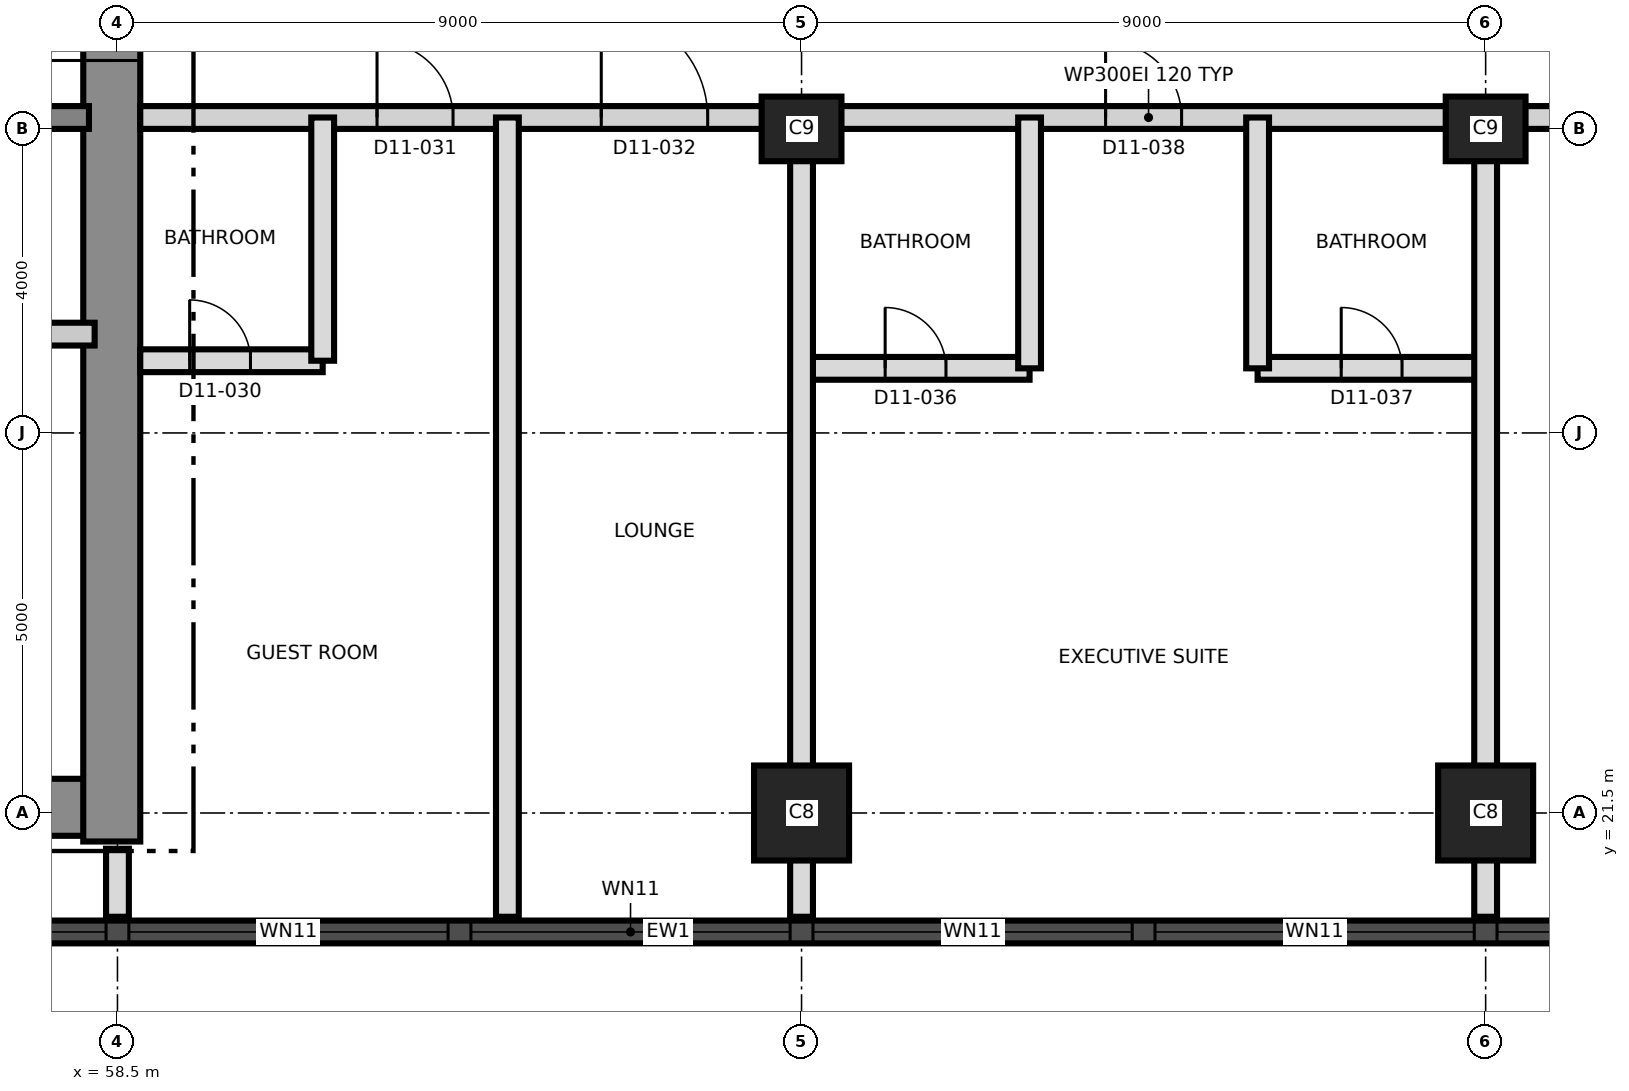
"""IFC4 building model, lengths in metres.
Left out: names, types, materials, properties, quantities, classifications, styles, units other than length and angle.
Written with IfcOpenShell. Run it as: python <this file> out.ifc"""

import sys

from ifc_helpers import new_model, si_unit, direction, frame, frame_2d, origin, origin_2d, place, context, subcontext, project, spatial, rectangle, extrude, element, fill, save


model = new_model("IFC4")
c1 = context("Model", 3, precision=1e-05, world=origin(), true_north=direction((0.0, 1.0)))
c2 = subcontext(c1, "Body", "Model", "MODEL_VIEW")
j1 = project(units=[si_unit("LENGTHUNIT", "METRE"), si_unit("PLANEANGLEUNIT", "RADIAN")], contexts=[c1])
p1 = place(None, origin())
s1 = spatial("IfcSite", under=j1, at=p1, CompositionType="ELEMENT")
p2 = place(p1, origin())
s2 = spatial("IfcBuilding", under=s1, at=p2, CompositionType="ELEMENT")
p3 = place(p2, frame((0.0, 0.0, 127.8)))
s3 = spatial("IfcBuildingStorey", under=s2, at=p3, CompositionType="ELEMENT", Elevation=127.8)
p4 = place(p3, frame((31.125, 21.575, 0.0), z_axis=(0.0, 0.0, 1.0), x_axis=(1.0, 0.0, 0.0)))
e1 = element("IfcWall", 1, at=p4, inside=s3, PredefinedType="SHEAR", context=c2, shape_type="SweptSolid", body=[
    extrude(rectangle(XDim=27.0, YDim=0.75, at=frame_2d((13.5, 0.0))), origin(), (0.0, 0.0, 1.0), 3.7),
])
p5 = place(p3, frame((58.425, 21.125, 0.0), z_axis=(0.0, 0.0, 1.0), x_axis=(0.0, 1.0, 0.0)))
e2 = element("IfcWall", 2, at=p5, inside=s3, PredefinedType="SHEAR", context=c2, shape_type="SweptSolid", body=[
    extrude(rectangle(XDim=18.75, YDim=0.75, at=frame_2d((9.375, 0.0))), origin(), (0.0, 0.0, 1.0), 3.7),
])
p6 = place(p5, frame((10.275, 0.0, 0.0)))
e3 = element("IfcOpeningElement", 3, at=p6, cuts=e2, PredefinedType="OPENING", context=c2, shape_type="SweptSolid", body=[
    extrude(rectangle(XDim=1.2, YDim=2.1, at=frame_2d((0.6, 1.05))), frame((0.0, 0.385, 0.0), z_axis=(0.0, -1.0, 0.0), x_axis=(1.0, 0.0, 0.0)), (0.0, 0.0, 1.0), 0.77),
])
p7 = place(p3, frame((31.875, 30.65, 0.0), z_axis=(0.0, 0.0, 1.0), x_axis=(1.0, 0.0, 0.0)))
e4 = element("IfcWall", 4, at=p7, inside=s3, PredefinedType="SHEAR", context=c2, shape_type="SweptSolid", body=[
    extrude(rectangle(XDim=26.25, YDim=0.3, at=frame_2d((13.125, 0.0))), origin(), (0.0, 0.0, 1.0), 3.7),
])
p8 = place(p7, frame((24.625, 0.0, 0.0)))
e5 = element("IfcOpeningElement", 5, at=p8, cuts=e4, PredefinedType="OPENING", context=c2, shape_type="SweptSolid", body=[
    extrude(rectangle(XDim=1.0, YDim=2.1, at=frame_2d((0.5, 1.05))), frame((0.0, 0.16, 0.0), z_axis=(0.0, -1.0, 0.0), x_axis=(1.0, 0.0, 0.0)), (0.0, 0.0, 1.0), 0.32),
])
p9 = place(p7, frame((11.425, 0.0, 0.0)))
e6 = element("IfcOpeningElement", 6, at=p9, cuts=e4, PredefinedType="OPENING", context=c2, shape_type="SweptSolid", body=[
    extrude(rectangle(XDim=1.0, YDim=2.1, at=frame_2d((0.5, 1.05))), frame((0.0, 0.16, 0.0), z_axis=(0.0, -1.0, 0.0), x_axis=(1.0, 0.0, 0.0)), (0.0, 0.0, 1.0), 0.32),
])
for number, where, z_axis, x_axis in (
    (7, (67.5, 21.5, 0.0), (0.0, 0.0, 1.0), (1.0, 0.0, 0.0)),
    (8, (76.5, 21.5, 0.0), (0.0, 0.0, 1.0), (1.0, 0.0, 0.0)),
):
    element("IfcColumn", number, at=place(p3, frame(where, z_axis=z_axis, x_axis=x_axis)), inside=s3, PredefinedType="COLUMN", context=c2, shape_type="SweptSolid", body=[
        extrude(rectangle(XDim=1.25, YDim=1.25, at=origin_2d()), origin(), (0.0, 0.0, 1.0), 3.7),
    ])
for number, where, z_axis, x_axis in (
    (9, (67.5, 30.5, 0.0), (0.0, 0.0, 1.0), (1.0, 0.0, 0.0)),
    (10, (76.5, 30.5, 0.0), (0.0, 0.0, 1.0), (1.0, 0.0, 0.0)),
):
    element("IfcColumn", number, at=place(p3, frame(where, z_axis=z_axis, x_axis=x_axis)), inside=s3, PredefinedType="COLUMN", context=c2, shape_type="SweptSolid", body=[
        extrude(rectangle(XDim=1.05, YDim=0.85, at=origin_2d()), origin(), (0.0, 0.0, 1.0), 3.7),
    ])
p10 = place(p3, frame((44.01, 19.935, 0.0), z_axis=(0.0, 0.0, 1.0), x_axis=(1.0, 0.0, 0.0)))
e11 = element("IfcWall", 11, at=p10, inside=s3, PredefinedType="SOLIDWALL", context=c2, shape_type="SweptSolid", body=[
    extrude(rectangle(XDim=43.477, YDim=0.3, at=frame_2d((21.738, 0.0))), origin(), (0.0, 0.0, 1.0), 3.4),
])
p11 = place(p10, frame((1.845, 0.0, 0.3)))
e12 = element("IfcOpeningElement", 12, at=p11, cuts=e11, PredefinedType="OPENING", context=c2, shape_type="SweptSolid", body=[
    extrude(rectangle(XDim=1.8, YDim=2.4, at=frame_2d((0.9, 1.2))), frame((0.0, 0.16, 0.0), z_axis=(0.0, -1.0, 0.0), x_axis=(1.0, 0.0, 0.0)), (0.0, 0.0, 1.0), 0.32),
])
p12 = place(p10, frame((5.64, 0.0, 0.9)))
e13 = element("IfcOpeningElement", 13, at=p12, cuts=e11, PredefinedType="OPENING", context=c2, shape_type="SweptSolid", body=[
    extrude(rectangle(XDim=4.2, YDim=1.5, at=frame_2d((2.1, 0.75))), frame((0.0, 0.16, 0.0), z_axis=(0.0, -1.0, 0.0), x_axis=(1.0, 0.0, 0.0)), (0.0, 0.0, 1.0), 0.32),
])
p13 = place(p10, frame((10.14, 0.0, 0.9)))
e14 = element("IfcOpeningElement", 14, at=p13, cuts=e11, PredefinedType="OPENING", context=c2, shape_type="SweptSolid", body=[
    extrude(rectangle(XDim=4.2, YDim=1.5, at=frame_2d((2.1, 0.75))), frame((0.0, 0.16, 0.0), z_axis=(0.0, -1.0, 0.0), x_axis=(1.0, 0.0, 0.0)), (0.0, 0.0, 1.0), 0.32),
])
p14 = place(p10, frame((14.64, 0.0, 0.9)))
e15 = element("IfcOpeningElement", 15, at=p14, cuts=e11, PredefinedType="OPENING", context=c2, shape_type="SweptSolid", body=[
    extrude(rectangle(XDim=4.2, YDim=1.5, at=frame_2d((2.1, 0.75))), frame((0.0, 0.16, 0.0), z_axis=(0.0, -1.0, 0.0), x_axis=(1.0, 0.0, 0.0)), (0.0, 0.0, 1.0), 0.32),
])
p15 = place(p10, frame((19.14, 0.0, 0.9)))
e16 = element("IfcOpeningElement", 16, at=p15, cuts=e11, PredefinedType="OPENING", context=c2, shape_type="SweptSolid", body=[
    extrude(rectangle(XDim=4.2, YDim=1.5, at=frame_2d((2.1, 0.75))), frame((0.0, 0.16, 0.0), z_axis=(0.0, -1.0, 0.0), x_axis=(1.0, 0.0, 0.0)), (0.0, 0.0, 1.0), 0.32),
])
p16 = place(p10, frame((23.64, 0.0, 0.9)))
e17 = element("IfcOpeningElement", 17, at=p16, cuts=e11, PredefinedType="OPENING", context=c2, shape_type="SweptSolid", body=[
    extrude(rectangle(XDim=4.2, YDim=1.5, at=frame_2d((2.1, 0.75))), frame((0.0, 0.16, 0.0), z_axis=(0.0, -1.0, 0.0), x_axis=(1.0, 0.0, 0.0)), (0.0, 0.0, 1.0), 0.32),
])
p17 = place(p10, frame((28.14, 0.0, 0.9)))
e18 = element("IfcOpeningElement", 18, at=p17, cuts=e11, PredefinedType="OPENING", context=c2, shape_type="SweptSolid", body=[
    extrude(rectangle(XDim=4.2, YDim=1.5, at=frame_2d((2.1, 0.75))), frame((0.0, 0.16, 0.0), z_axis=(0.0, -1.0, 0.0), x_axis=(1.0, 0.0, 0.0)), (0.0, 0.0, 1.0), 0.32),
])
p18 = place(p10, frame((32.64, 0.0, 0.9)))
e19 = element("IfcOpeningElement", 19, at=p18, cuts=e11, PredefinedType="OPENING", context=c2, shape_type="SweptSolid", body=[
    extrude(rectangle(XDim=4.2, YDim=1.5, at=frame_2d((2.1, 0.75))), frame((0.0, 0.16, 0.0), z_axis=(0.0, -1.0, 0.0), x_axis=(1.0, 0.0, 0.0)), (0.0, 0.0, 1.0), 0.32),
])
p19 = place(p10, frame((37.14, 0.0, 0.9)))
e20 = element("IfcOpeningElement", 20, at=p19, cuts=e11, PredefinedType="OPENING", context=c2, shape_type="SweptSolid", body=[
    extrude(rectangle(XDim=4.2, YDim=1.5, at=frame_2d((2.1, 0.75))), frame((0.0, 0.16, 0.0), z_axis=(0.0, -1.0, 0.0), x_axis=(1.0, 0.0, 0.0)), (0.0, 0.0, 1.0), 0.32),
])
p20 = place(p3, frame((55.8, 27.8, 0.0), z_axis=(0.0, 0.0, 1.0), x_axis=(1.0, 0.0, 0.0)))
e21 = element("IfcWall", 21, at=p20, inside=s3, PredefinedType="PARTITIONING", context=c2, shape_type="SweptSolid", body=[
    extrude(rectangle(XDim=2.4, YDim=0.3, at=frame_2d((1.2, 0.0))), origin(), (0.0, 0.0, 1.0), 3.4),
])
p21 = place(p20, frame((0.75, 0.0, 0.0)))
e22 = element("IfcOpeningElement", 22, at=p21, cuts=e21, PredefinedType="OPENING", context=c2, shape_type="SweptSolid", body=[
    extrude(rectangle(XDim=0.9, YDim=2.1, at=frame_2d((0.45, 1.05))), frame((0.0, 0.16, 0.0), z_axis=(0.0, -1.0, 0.0), x_axis=(1.0, 0.0, 0.0)), (0.0, 0.0, 1.0), 0.32),
])
p22 = place(p3, frame((67.5, 27.35, 0.0), z_axis=(0.0, 0.0, 1.0), x_axis=(1.0, 0.0, 0.0)))
e23 = element("IfcWall", 23, at=p22, inside=s3, PredefinedType="PARTITIONING", context=c2, shape_type="SweptSolid", body=[
    extrude(rectangle(XDim=3.0, YDim=0.3, at=frame_2d((1.5, 0.0))), origin(), (0.0, 0.0, 1.0), 3.4),
])
p23 = place(p22, frame((1.1, 0.0, 0.0)))
e24 = element("IfcOpeningElement", 24, at=p23, cuts=e23, PredefinedType="OPENING", context=c2, shape_type="SweptSolid", body=[
    extrude(rectangle(XDim=0.8, YDim=2.1, at=frame_2d((0.4, 1.05))), frame((0.0, 0.16, 0.0), z_axis=(0.0, -1.0, 0.0), x_axis=(1.0, 0.0, 0.0)), (0.0, 0.0, 1.0), 0.32),
])
p24 = place(p3, frame((73.5, 27.35, 0.0), z_axis=(0.0, 0.0, 1.0), x_axis=(1.0, 0.0, 0.0)))
e25 = element("IfcWall", 25, at=p24, inside=s3, PredefinedType="PARTITIONING", context=c2, shape_type="SweptSolid", body=[
    extrude(rectangle(XDim=3.0, YDim=0.3, at=frame_2d((1.5, 0.0))), origin(), (0.0, 0.0, 1.0), 3.4),
])
p25 = place(p24, frame((1.1, 0.0, 0.0)))
e26 = element("IfcOpeningElement", 26, at=p25, cuts=e25, PredefinedType="OPENING", context=c2, shape_type="SweptSolid", body=[
    extrude(rectangle(XDim=0.8, YDim=2.1, at=frame_2d((0.4, 1.05))), frame((0.0, 0.16, 0.0), z_axis=(0.0, -1.0, 0.0), x_axis=(1.0, 0.0, 0.0)), (0.0, 0.0, 1.0), 0.32),
])
p26 = place(p3, frame((58.8, 27.45, 0.0), z_axis=(0.0, 0.0, 1.0), x_axis=(1.0, 0.0, 0.0)))
e27 = element("IfcWall", 27, at=p26, inside=s3, PredefinedType="PARTITIONING", context=c2, shape_type="SweptSolid", body=[
    extrude(rectangle(XDim=2.4, YDim=0.3, at=frame_2d((1.2, 0.0))), origin(), (0.0, 0.0, 1.0), 3.4),
])
p27 = place(p26, frame((0.65, 0.0, 0.0)))
e28 = element("IfcOpeningElement", 28, at=p27, cuts=e27, PredefinedType="OPENING", context=c2, shape_type="SweptSolid", body=[
    extrude(rectangle(XDim=0.8, YDim=2.1, at=frame_2d((0.4, 1.05))), frame((0.0, 0.16, 0.0), z_axis=(0.0, -1.0, 0.0), x_axis=(1.0, 0.0, 0.0)), (0.0, 0.0, 1.0), 0.32),
])
p28 = place(p3, frame((58.8, 30.65, 0.0), z_axis=(0.0, 0.0, 1.0), x_axis=(1.0, 0.0, 0.0)))
e29 = element("IfcWall", 29, at=p28, inside=s3, PredefinedType="PARTITIONING", context=c2, shape_type="SweptSolid", body=[
    extrude(rectangle(XDim=26.53, YDim=0.3, at=frame_2d((13.265, 0.0))), origin(), (0.0, 0.0, 1.0), 3.4),
])
p29 = place(p28, frame((3.115, 0.0, 0.0)))
e30 = element("IfcOpeningElement", 30, at=p29, cuts=e29, PredefinedType="OPENING", context=c2, shape_type="SweptSolid", body=[
    extrude(rectangle(XDim=1.0, YDim=2.1, at=frame_2d((0.5, 1.05))), frame((0.0, 0.16, 0.0), z_axis=(0.0, -1.0, 0.0), x_axis=(1.0, 0.0, 0.0)), (0.0, 0.0, 1.0), 0.32),
])
p30 = place(p28, frame((6.065, 0.0, 0.0)))
e31 = element("IfcOpeningElement", 31, at=p30, cuts=e29, PredefinedType="OPENING", context=c2, shape_type="SweptSolid", body=[
    extrude(rectangle(XDim=1.4, YDim=2.1, at=frame_2d((0.7, 1.05))), frame((0.0, 0.16, 0.0), z_axis=(0.0, -1.0, 0.0), x_axis=(1.0, 0.0, 0.0)), (0.0, 0.0, 1.0), 0.32),
])
p31 = place(p28, frame((12.7, 0.0, 0.0)))
e32 = element("IfcOpeningElement", 32, at=p31, cuts=e29, PredefinedType="OPENING", context=c2, shape_type="SweptSolid", body=[
    extrude(rectangle(XDim=1.0, YDim=2.4, at=frame_2d((0.5, 1.2))), frame((0.0, 0.16, 0.0), z_axis=(0.0, -1.0, 0.0), x_axis=(1.0, 0.0, 0.0)), (0.0, 0.0, 1.0), 0.32),
])
p32 = place(p28, frame((18.85, 0.0, 0.0)))
e33 = element("IfcOpeningElement", 33, at=p32, cuts=e29, PredefinedType="OPENING", context=c2, shape_type="SweptSolid", body=[
    extrude(rectangle(XDim=1.0, YDim=2.1, at=frame_2d((0.5, 1.05))), frame((0.0, 0.16, 0.0), z_axis=(0.0, -1.0, 0.0), x_axis=(1.0, 0.0, 0.0)), (0.0, 0.0, 1.0), 0.32),
])
p33 = place(p28, frame((24.7, 0.0, 0.0)))
e34 = element("IfcOpeningElement", 34, at=p33, cuts=e29, PredefinedType="OPENING", context=c2, shape_type="SweptSolid", body=[
    extrude(rectangle(XDim=1.0, YDim=2.1, at=frame_2d((0.5, 1.05))), frame((0.0, 0.16, 0.0), z_axis=(0.0, -1.0, 0.0), x_axis=(1.0, 0.0, 0.0)), (0.0, 0.0, 1.0), 0.32),
])
p34 = place(p3, frame((58.5, 20.135, 0.0), z_axis=(0.0, 0.0, 1.0), x_axis=(0.0, 1.0, 0.0)))
e35 = element("IfcWall", 35, at=p34, inside=s3, PredefinedType="PARTITIONING", context=c2, shape_type="SweptSolid", body=[
    extrude(rectangle(XDim=0.895, YDim=0.3, at=frame_2d((0.448, 0.0))), origin(), (0.0, 0.0, 1.0), 3.4),
])
p35 = place(p3, frame((61.2, 27.45, 0.0), z_axis=(0.0, 0.0, 1.0), x_axis=(0.0, 1.0, 0.0)))
e36 = element("IfcWall", 36, at=p35, inside=s3, PredefinedType="PARTITIONING", context=c2, shape_type="SweptSolid", body=[
    extrude(rectangle(XDim=3.2, YDim=0.3, at=frame_2d((1.6, 0.0))), origin(), (0.0, 0.0, 1.0), 3.4),
])
for number, where, z_axis, x_axis in (
    (37, (63.63, 20.135, 0.0), (0.0, 0.0, 1.0), (0.0, 1.0, 0.0)),
    (38, (67.5, 20.135, 0.0), (0.0, 0.0, 1.0), (0.0, 1.0, 0.0)),
):
    element("IfcWall", number, at=place(p3, frame(where, z_axis=z_axis, x_axis=x_axis)), inside=s3, PredefinedType="PARTITIONING", context=c2, shape_type="SweptSolid", body=[
        extrude(rectangle(XDim=10.515, YDim=0.3, at=frame_2d((5.257, 0.0))), origin(), (0.0, 0.0, 1.0), 3.4),
    ])
for number, where, z_axis, x_axis in (
    (39, (70.5, 27.35, 0.0), (0.0, 0.0, 1.0), (0.0, 1.0, 0.0)),
    (40, (73.5, 27.35, 0.0), (0.0, 0.0, 1.0), (0.0, 1.0, 0.0)),
):
    element("IfcWall", number, at=place(p3, frame(where, z_axis=z_axis, x_axis=x_axis)), inside=s3, PredefinedType="PARTITIONING", context=c2, shape_type="SweptSolid", body=[
        extrude(rectangle(XDim=3.3, YDim=0.3, at=frame_2d((1.65, 0.0))), origin(), (0.0, 0.0, 1.0), 3.4),
    ])
p36 = place(p3, frame((76.5, 20.135, 0.0), z_axis=(0.0, 0.0, 1.0), x_axis=(0.0, 1.0, 0.0)))
e41 = element("IfcWall", 41, at=p36, inside=s3, PredefinedType="PARTITIONING", context=c2, shape_type="SweptSolid", body=[
    extrude(rectangle(XDim=10.515, YDim=0.3, at=frame_2d((5.257, 0.0))), origin(), (0.0, 0.0, 1.0), 3.4),
])
p37 = place(p13, origin())
e42 = element("IfcWindow", 42, at=p37, inside=s3, PartitioningType="SINGLE_PANEL", PredefinedType="WINDOW", context=c2, shape_type="SweptSolid", body=[
    extrude(rectangle(XDim=4.2, YDim=1.5, at=frame_2d((2.1, 0.75))), frame((0.0, 0.03, 0.0), z_axis=(0.0, -1.0, 0.0), x_axis=(1.0, 0.0, 0.0)), (0.0, 0.0, 1.0), 0.06),
])
fill(e14, e42)
p38 = place(p14, origin())
e43 = element("IfcWindow", 43, at=p38, inside=s3, PartitioningType="SINGLE_PANEL", PredefinedType="WINDOW", context=c2, shape_type="SweptSolid", body=[
    extrude(rectangle(XDim=4.2, YDim=1.5, at=frame_2d((2.1, 0.75))), frame((0.0, 0.03, 0.0), z_axis=(0.0, -1.0, 0.0), x_axis=(1.0, 0.0, 0.0)), (0.0, 0.0, 1.0), 0.06),
])
fill(e15, e43)
p39 = place(p15, origin())
e44 = element("IfcWindow", 44, at=p39, inside=s3, PartitioningType="SINGLE_PANEL", PredefinedType="WINDOW", context=c2, shape_type="SweptSolid", body=[
    extrude(rectangle(XDim=4.2, YDim=1.5, at=frame_2d((2.1, 0.75))), frame((0.0, 0.03, 0.0), z_axis=(0.0, -1.0, 0.0), x_axis=(1.0, 0.0, 0.0)), (0.0, 0.0, 1.0), 0.06),
])
fill(e16, e44)
p40 = place(p16, origin())
e45 = element("IfcWindow", 45, at=p40, inside=s3, PartitioningType="SINGLE_PANEL", PredefinedType="WINDOW", context=c2, shape_type="SweptSolid", body=[
    extrude(rectangle(XDim=4.2, YDim=1.5, at=frame_2d((2.1, 0.75))), frame((0.0, 0.03, 0.0), z_axis=(0.0, -1.0, 0.0), x_axis=(1.0, 0.0, 0.0)), (0.0, 0.0, 1.0), 0.06),
])
fill(e17, e45)
p41 = place(p17, origin())
e46 = element("IfcWindow", 46, at=p41, inside=s3, PartitioningType="SINGLE_PANEL", PredefinedType="WINDOW", context=c2, shape_type="SweptSolid", body=[
    extrude(rectangle(XDim=4.2, YDim=1.5, at=frame_2d((2.1, 0.75))), frame((0.0, 0.03, 0.0), z_axis=(0.0, -1.0, 0.0), x_axis=(1.0, 0.0, 0.0)), (0.0, 0.0, 1.0), 0.06),
])
fill(e18, e46)
p42 = place(p18, origin())
e47 = element("IfcWindow", 47, at=p42, inside=s3, PartitioningType="SINGLE_PANEL", PredefinedType="WINDOW", context=c2, shape_type="SweptSolid", body=[
    extrude(rectangle(XDim=4.2, YDim=1.5, at=frame_2d((2.1, 0.75))), frame((0.0, 0.03, 0.0), z_axis=(0.0, -1.0, 0.0), x_axis=(1.0, 0.0, 0.0)), (0.0, 0.0, 1.0), 0.06),
])
fill(e19, e47)
p43 = place(p6, origin())
e48 = element("IfcDoor", 48, at=p43, inside=s3, OperationType="SINGLE_SWING_LEFT", PredefinedType="DOOR", context=c2, shape_type="SweptSolid", body=[
    extrude(rectangle(XDim=1.2, YDim=2.1, at=frame_2d((0.6, 1.05))), frame((0.0, 0.025, 0.0), z_axis=(0.0, -1.0, 0.0), x_axis=(1.0, 0.0, 0.0)), (0.0, 0.0, 1.0), 0.05),
])
fill(e3, e48)
p44 = place(p27, origin())
e49 = element("IfcDoor", 49, at=p44, inside=s3, OperationType="SINGLE_SWING_LEFT", PredefinedType="DOOR", context=c2, shape_type="SweptSolid", body=[
    extrude(rectangle(XDim=0.8, YDim=2.1, at=frame_2d((0.4, 1.05))), frame((0.0, 0.025, 0.0), z_axis=(0.0, -1.0, 0.0), x_axis=(1.0, 0.0, 0.0)), (0.0, 0.0, 1.0), 0.05),
])
fill(e28, e49)
p45 = place(p29, origin())
e50 = element("IfcDoor", 50, at=p45, inside=s3, OperationType="SINGLE_SWING_LEFT", PredefinedType="DOOR", context=c2, shape_type="SweptSolid", body=[
    extrude(rectangle(XDim=1.0, YDim=2.1, at=frame_2d((0.5, 1.05))), frame((0.0, 0.025, 0.0), z_axis=(0.0, -1.0, 0.0), x_axis=(1.0, 0.0, 0.0)), (0.0, 0.0, 1.0), 0.05),
])
fill(e30, e50)
p46 = place(p30, origin())
e51 = element("IfcDoor", 51, at=p46, inside=s3, OperationType="SINGLE_SWING_RIGHT", PredefinedType="DOOR", context=c2, shape_type="SweptSolid", body=[
    extrude(rectangle(XDim=1.4, YDim=2.1, at=frame_2d((0.7, 1.05))), frame((0.0, 0.025, 0.0), z_axis=(0.0, -1.0, 0.0), x_axis=(1.0, 0.0, 0.0)), (0.0, 0.0, 1.0), 0.05),
])
fill(e31, e51)
p47 = place(p23, origin())
e52 = element("IfcDoor", 52, at=p47, inside=s3, OperationType="SINGLE_SWING_LEFT", PredefinedType="DOOR", context=c2, shape_type="SweptSolid", body=[
    extrude(rectangle(XDim=0.8, YDim=2.1, at=frame_2d((0.4, 1.05))), frame((0.0, 0.025, 0.0), z_axis=(0.0, -1.0, 0.0), x_axis=(1.0, 0.0, 0.0)), (0.0, 0.0, 1.0), 0.05),
])
fill(e24, e52)
p48 = place(p25, origin())
e53 = element("IfcDoor", 53, at=p48, inside=s3, OperationType="SINGLE_SWING_RIGHT", PredefinedType="DOOR", context=c2, shape_type="SweptSolid", body=[
    extrude(rectangle(XDim=0.8, YDim=2.1, at=frame_2d((0.4, 1.05))), frame((0.0, 0.025, 0.0), z_axis=(0.0, -1.0, 0.0), x_axis=(1.0, 0.0, 0.0)), (0.0, 0.0, 1.0), 0.05),
])
fill(e26, e53)
p49 = place(p31, origin())
e54 = element("IfcDoor", 54, at=p49, inside=s3, OperationType="SINGLE_SWING_LEFT", PredefinedType="DOOR", context=c2, shape_type="SweptSolid", body=[
    extrude(rectangle(XDim=1.0, YDim=2.4, at=frame_2d((0.5, 1.2))), frame((0.0, 0.025, 0.0), z_axis=(0.0, -1.0, 0.0), x_axis=(1.0, 0.0, 0.0)), (0.0, 0.0, 1.0), 0.05),
])
fill(e32, e54)
save(model, sys.argv[1])
